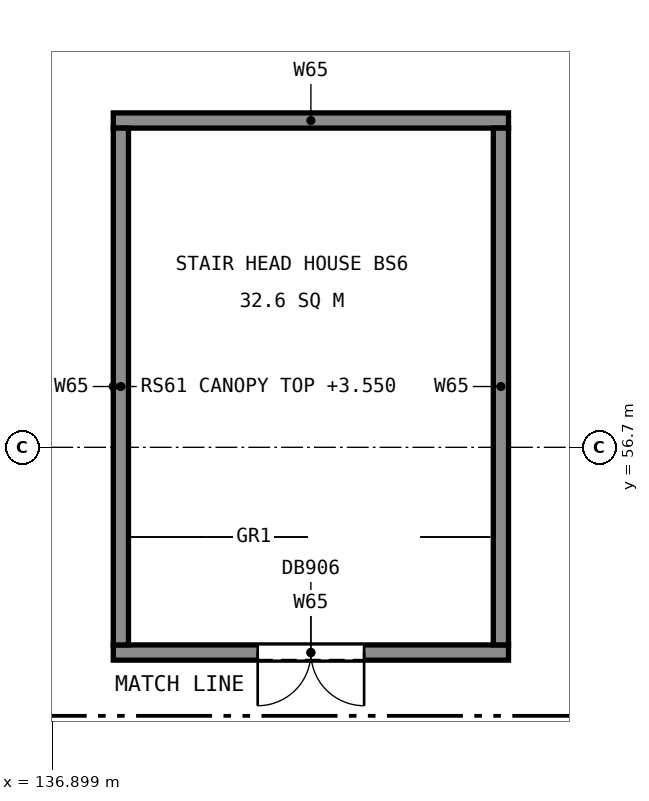
"""IFC4 building model, lengths in metres.
Left out: names, types, materials, properties, quantities, classifications, styles, units other than length and angle.
Written with IfcOpenShell. Run it as: python <this file> out.ifc"""

import sys

from ifc_helpers import new_model, si_unit, direction, frame, frame_2d, origin, place, context, subcontext, project, spatial, rectangle, extrude, element, fill, save


model = new_model("IFC4")
c1 = context("Model", 3, precision=1e-05, world=origin(), true_north=direction((0.0, 1.0)))
c2 = subcontext(c1, "Body", "Model", "MODEL_VIEW")
j1 = project(units=[si_unit("LENGTHUNIT", "METRE"), si_unit("PLANEANGLEUNIT", "RADIAN")], contexts=[c1])
p1 = place(None, origin())
s1 = spatial("IfcSite", under=j1, at=p1, CompositionType="ELEMENT")
p2 = place(p1, origin())
s2 = spatial("IfcBuilding", under=s1, at=p2, CompositionType="ELEMENT")
p3 = place(p2, origin())
s3 = spatial("IfcBuildingStorey", under=s2, at=p3, CompositionType="ELEMENT", Elevation=0.0)
p4 = place(p3, frame((137.7, 54.0, 0.0), z_axis=(0.0, 0.0, 1.0), x_axis=(1.0, 0.0, 0.0)))
e1 = element("IfcWall", 1, at=p4, inside=s3, PredefinedType="SOLIDWALL", context=c2, shape_type="SweptSolid", body=[
    extrude(rectangle(XDim=5.2, YDim=0.2, at=frame_2d((2.6, 0.0))), origin(), (0.0, 0.0, 1.0), 3.3),
])
p5 = place(p4, frame((1.9, 0.0, 0.0)))
e2 = element("IfcOpeningElement", 2, at=p5, cuts=e1, PredefinedType="OPENING", context=c2, shape_type="SweptSolid", body=[
    extrude(rectangle(XDim=1.4, YDim=2.1, at=frame_2d((0.7, 1.05))), frame((0.0, 0.11, 0.0), z_axis=(0.0, -1.0, 0.0), x_axis=(1.0, 0.0, 0.0)), (0.0, 0.0, 1.0), 0.22),
])
p6 = place(p3, frame((137.7, 61.0, 0.0), z_axis=(0.0, 0.0, 1.0), x_axis=(1.0, 0.0, 0.0)))
e3 = element("IfcWall", 3, at=p6, inside=s3, PredefinedType="SOLIDWALL", context=c2, shape_type="SweptSolid", body=[
    extrude(rectangle(XDim=5.2, YDim=0.2, at=frame_2d((2.6, 0.0))), origin(), (0.0, 0.0, 1.0), 3.3),
])
for number, where, z_axis, x_axis in (
    (4, (137.8, 54.1, 0.0), (0.0, 0.0, 1.0), (0.0, 1.0, 0.0)),
    (5, (142.8, 54.1, 0.0), (0.0, 0.0, 1.0), (0.0, 1.0, 0.0)),
):
    element("IfcWall", number, at=place(p3, frame(where, z_axis=z_axis, x_axis=x_axis)), inside=s3, PredefinedType="SOLIDWALL", context=c2, shape_type="SweptSolid", body=[
        extrude(rectangle(XDim=6.8, YDim=0.2, at=frame_2d((3.4, 0.0))), origin(), (0.0, 0.0, 1.0), 3.3),
    ])
p7 = place(p5, frame((1.4, 0.0, 0.0), z_axis=(0.0, 0.0, 1.0), x_axis=(-1.0, 0.0, 0.0)))
e6 = element("IfcDoor", 6, at=p7, inside=s3, OperationType="DOUBLE_DOOR_SINGLE_SWING", PredefinedType="DOOR", context=c2, shape_type="SweptSolid", body=[
    extrude(rectangle(XDim=1.4, YDim=2.1, at=frame_2d((0.7, 1.05))), frame((0.0, 0.025, 0.0), z_axis=(0.0, -1.0, 0.0), x_axis=(1.0, 0.0, 0.0)), (0.0, 0.0, 1.0), 0.05),
])
fill(e2, e6)
save(model, sys.argv[1])
